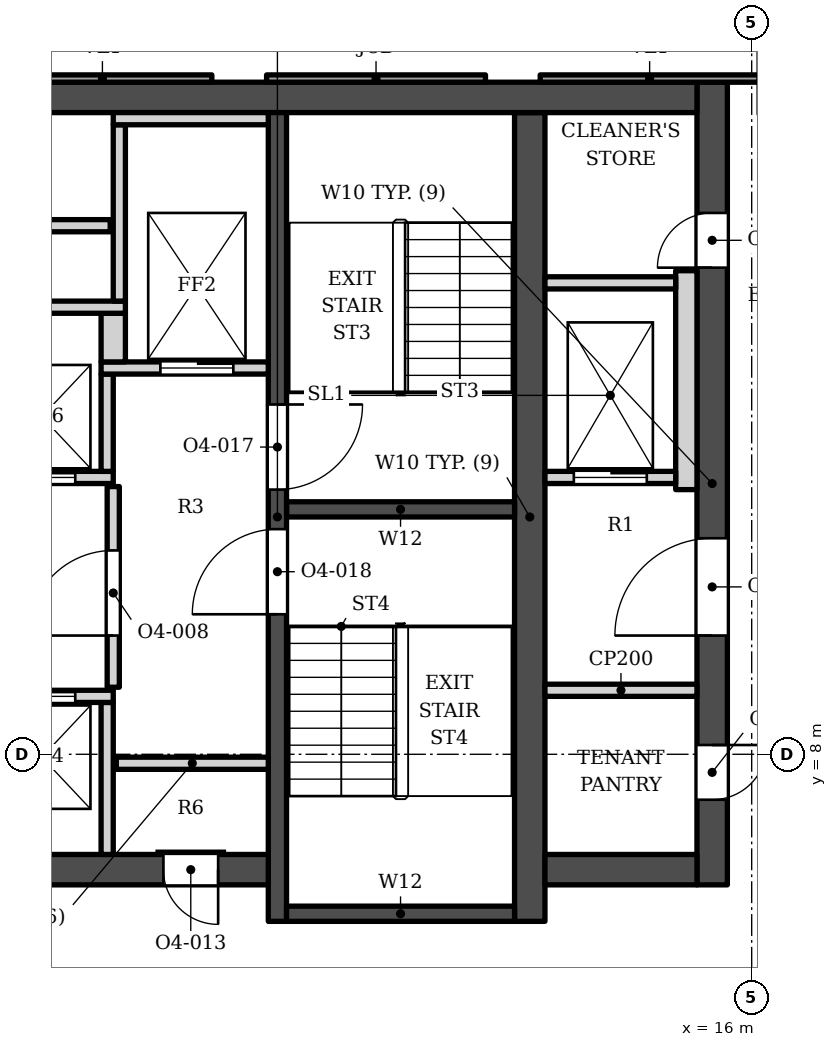
"""IFC4 building model, lengths in metres.
Left out: names, types, materials, properties, quantities, classifications, styles, units other than length and angle.
Written with IfcOpenShell. Run it as: python <this file> out.ifc"""

import sys

from ifc_helpers import new_model, si_unit, direction, frame, frame_2d, origin, place, context, subcontext, project, spatial, polyline, rectangle, outline, extrude, element, fill, save


model = new_model("IFC4")
c1 = context("Model", 3, precision=1e-05, world=origin(), true_north=direction((0.0, 1.0)))
c2 = subcontext(c1, "Body", "Model", "MODEL_VIEW")
j1 = project(units=[si_unit("LENGTHUNIT", "METRE"), si_unit("PLANEANGLEUNIT", "RADIAN")], contexts=[c1])
p1 = place(None, origin())
s1 = spatial("IfcSite", under=j1, at=p1, CompositionType="ELEMENT")
p2 = place(p1, origin())
s2 = spatial("IfcBuilding", under=s1, at=p2, CompositionType="ELEMENT")
p3 = place(p2, frame((0.0, 0.0, 179.7)))
s3 = spatial("IfcBuildingStorey", under=s2, at=p3, CompositionType="ELEMENT", Elevation=179.7)
p4 = place(p3, frame((-15.1, 18.802, 0.0), z_axis=(0.0, 0.0, 1.0), x_axis=(1.0, 0.0, 0.0)))
e1 = element("IfcWall", 1, at=p4, inside=s3, PredefinedType="SHEAR", context=c2, shape_type="SweptSolid", body=[
    extrude(rectangle(XDim=30.2, YDim=0.5, at=frame_2d((15.1, 0.0))), origin(), (0.0, 0.0, 1.0), 3.9),
])
p5 = place(p3, frame((12.35, 5.253, 0.0), z_axis=(0.0, 0.0, 1.0), x_axis=(0.0, 1.0, 0.0)))
e2 = element("IfcWall", 2, at=p5, inside=s3, PredefinedType="SHEAR", context=c2, shape_type="SweptSolid", body=[
    extrude(rectangle(XDim=13.3, YDim=0.5, at=frame_2d((6.65, 0.0))), origin(), (0.0, 0.0, 1.0), 3.9),
])
p6 = place(p3, frame((8.2, 5.253, 0.0), z_axis=(0.0, 0.0, 1.0), x_axis=(0.0, 1.0, 0.0)))
e3 = element("IfcWall", 3, at=p6, inside=s3, PredefinedType="SHEAR", context=c2, shape_type="SweptSolid", body=[
    extrude(rectangle(XDim=13.3, YDim=0.3, at=frame_2d((6.65, 0.0))), origin(), (0.0, 0.0, 1.0), 3.9),
])
p7 = place(p6, frame((7.1, 0.0, 0.0)))
e4 = element("IfcOpeningElement", 4, at=p7, cuts=e3, PredefinedType="OPENING", context=c2, shape_type="SweptSolid", body=[
    extrude(rectangle(XDim=1.4, YDim=2.1, at=frame_2d((0.7, 1.05))), frame((0.0, 0.16, 0.0), z_axis=(0.0, -1.0, 0.0), x_axis=(1.0, 0.0, 0.0)), (0.0, 0.0, 1.0), 0.32),
])
p8 = place(p6, frame((5.05, 0.0, 0.0)))
e5 = element("IfcOpeningElement", 5, at=p8, cuts=e3, PredefinedType="OPENING", context=c2, shape_type="SweptSolid", body=[
    extrude(rectangle(XDim=1.4, YDim=2.1, at=frame_2d((0.7, 1.05))), frame((0.0, 0.16, 0.0), z_axis=(0.0, -1.0, 0.0), x_axis=(1.0, 0.0, 0.0)), (0.0, 0.0, 1.0), 0.32),
])
for number, where, z_axis, x_axis in (
    (6, (8.35, 12.028, 0.0), (0.0, 0.0, 1.0), (1.0, 0.0, 0.0)),
    (7, (8.35, 5.378, 0.0), (0.0, 0.0, 1.0), (1.0, 0.0, 0.0)),
):
    element("IfcWall", number, at=place(p3, frame(where, z_axis=z_axis, x_axis=x_axis)), inside=s3, PredefinedType="SHEAR", context=c2, shape_type="SweptSolid", body=[
        extrude(rectangle(XDim=3.75, YDim=0.25, at=frame_2d((1.875, 0.0))), origin(), (0.0, 0.0, 1.0), 3.9),
    ])
p9 = place(p3, frame((1.0, 6.103, 0.0), z_axis=(0.0, 0.0, 1.0), x_axis=(1.0, 0.0, 0.0)))
e8 = element("IfcWall", 8, at=p9, inside=s3, PredefinedType="SHEAR", context=c2, shape_type="SweptSolid", body=[
    extrude(rectangle(XDim=7.05, YDim=0.5, at=frame_2d((3.525, 0.0))), origin(), (0.0, 0.0, 1.0), 3.9),
])
p10 = place(p9, frame((5.325, 0.0, 0.0)))
e9 = element("IfcOpeningElement", 9, at=p10, cuts=e8, PredefinedType="OPENING", context=c2, shape_type="SweptSolid", body=[
    extrude(rectangle(XDim=0.9, YDim=2.1, at=frame_2d((0.45, 1.05))), frame((0.0, 0.26, 0.0), z_axis=(0.0, -1.0, 0.0), x_axis=(1.0, 0.0, 0.0)), (0.0, 0.0, 1.0), 0.52),
])
p11 = place(p3, frame((12.6, 6.103, 0.0), z_axis=(0.0, 0.0, 1.0), x_axis=(1.0, 0.0, 0.0)))
e10 = element("IfcWall", 10, at=p11, inside=s3, PredefinedType="SHEAR", context=c2, shape_type="SweptSolid", body=[
    extrude(rectangle(XDim=2.5, YDim=0.5, at=frame_2d((1.25, 0.0))), origin(), (0.0, 0.0, 1.0), 3.9),
])
p12 = place(p3, frame((15.35, 5.853, 0.0), z_axis=(0.0, 0.0, 1.0), x_axis=(0.0, 1.0, 0.0)))
e11 = element("IfcWall", 11, at=p12, inside=s3, PredefinedType="SHEAR", context=c2, shape_type="SweptSolid", body=[
    extrude(rectangle(XDim=13.2, YDim=0.5, at=frame_2d((6.6, 0.0))), origin(), (0.0, 0.0, 1.0), 3.9),
])
p13 = place(p12, frame((4.1, 0.0, 0.0)))
e12 = element("IfcOpeningElement", 12, at=p13, cuts=e11, PredefinedType="OPENING", context=c2, shape_type="SweptSolid", body=[
    extrude(rectangle(XDim=1.6, YDim=2.1, at=frame_2d((0.8, 1.05))), frame((0.0, 0.26, 0.0), z_axis=(0.0, -1.0, 0.0), x_axis=(1.0, 0.0, 0.0)), (0.0, 0.0, 1.0), 0.52),
])
p14 = place(p12, frame((1.4, 0.0, 0.0)))
e13 = element("IfcOpeningElement", 13, at=p14, cuts=e11, PredefinedType="OPENING", context=c2, shape_type="SweptSolid", body=[
    extrude(rectangle(XDim=0.9, YDim=2.1, at=frame_2d((0.45, 1.05))), frame((0.0, 0.26, 0.0), z_axis=(0.0, -1.0, 0.0), x_axis=(1.0, 0.0, 0.0)), (0.0, 0.0, 1.0), 0.52),
])
p15 = place(p12, frame((10.15, 0.0, 0.0)))
e14 = element("IfcOpeningElement", 14, at=p15, cuts=e11, PredefinedType="OPENING", context=c2, shape_type="SweptSolid", body=[
    extrude(rectangle(XDim=0.9, YDim=2.1, at=frame_2d((0.45, 1.05))), frame((0.0, 0.26, 0.0), z_axis=(0.0, -1.0, 0.0), x_axis=(1.0, 0.0, 0.0)), (0.0, 0.0, 1.0), 0.52),
])
p16 = place(p3, origin())
e15 = element("IfcWall", 15, at=p16, inside=s3, PredefinedType="ELEMENTEDWALL", context=c2, shape_type="SweptSolid", body=[
    extrude(outline(polyline([(12.522, 19.173), (12.522, 19.052), (16.121, 19.052), (16.121, 19.173), (12.522, 19.173)])), origin(), (0.0, 0.0, 1.0), 3.0),
])
p17 = place(p3, origin())
e16 = element("IfcWall", 16, at=p17, inside=s3, PredefinedType="SOLIDWALL", context=c2, shape_type="SweptSolid", body=[
    extrude(outline(polyline([(8.022, 19.173), (8.022, 19.052), (11.622, 19.052), (11.622, 19.173), (8.022, 19.173)])), origin(), (0.0, 0.0, 1.0), 3.0),
])
p18 = place(p3, origin())
e17 = element("IfcWall", 17, at=p18, inside=s3, PredefinedType="ELEMENTEDWALL", context=c2, shape_type="SweptSolid", body=[
    extrude(outline(polyline([(3.522, 19.173), (3.522, 19.052), (7.122, 19.052), (7.122, 19.173), (3.522, 19.173)])), origin(), (0.0, 0.0, 1.0), 3.0),
])
for number, where, z_axis, x_axis in (
    (18, (5.4, 6.353, 0.0), (0.0, 0.0, 1.0), (0.0, 1.0, 0.0)),
    (19, (5.55, 7.853, 0.0), (0.0, 0.0, 1.0), (1.0, 0.0, 0.0)),
):
    element("IfcWall", number, at=place(p3, frame(where, z_axis=z_axis, x_axis=x_axis)), inside=s3, PredefinedType="SOLIDWALL", context=c2, shape_type="SweptSolid", body=[
        extrude(rectangle(XDim=2.5, YDim=0.2, at=frame_2d((1.25, 0.0))), origin(), (0.0, 0.0, 1.0), 3.73),
    ])
p19 = place(p3, frame((1.0, 8.953, 0.0), z_axis=(0.0, 0.0, 1.0), x_axis=(1.0, 0.0, 0.0)))
e20 = element("IfcWall", 20, at=p19, inside=s3, PredefinedType="SOLIDWALL", context=c2, shape_type="SweptSolid", body=[
    extrude(rectangle(XDim=4.5, YDim=0.2, at=frame_2d((2.25, 0.0))), origin(), (0.0, 0.0, 1.0), 3.73),
])
p20 = place(p19, frame((0.625, 0.0, 0.0)))
e21 = element("IfcOpeningElement", 21, at=p20, cuts=e20, PredefinedType="OPENING", context=c2, shape_type="SweptSolid", body=[
    extrude(rectangle(XDim=1.1, YDim=2.1, at=frame_2d((0.55, 1.05))), frame((0.0, 0.11, 0.0), z_axis=(0.0, -1.0, 0.0), x_axis=(1.0, 0.0, 0.0)), (0.0, 0.0, 1.0), 0.22),
])
p21 = place(p19, frame((2.775, 0.0, 0.0)))
e22 = element("IfcOpeningElement", 22, at=p21, cuts=e20, PredefinedType="OPENING", context=c2, shape_type="SweptSolid", body=[
    extrude(rectangle(XDim=1.1, YDim=2.1, at=frame_2d((0.55, 1.05))), frame((0.0, 0.11, 0.0), z_axis=(0.0, -1.0, 0.0), x_axis=(1.0, 0.0, 0.0)), (0.0, 0.0, 1.0), 0.22),
])
p22 = place(p3, frame((12.6, 9.052, 0.0), z_axis=(0.0, 0.0, 1.0), x_axis=(1.0, 0.0, 0.0)))
e23 = element("IfcWall", 23, at=p22, inside=s3, PredefinedType="PARTITIONING", context=c2, shape_type="SweptSolid", body=[
    extrude(rectangle(XDim=2.5, YDim=0.2, at=frame_2d((1.25, 0.0))), origin(), (0.0, 0.0, 1.0), 3.73),
])
p23 = place(p3, frame((5.5, 9.103, 0.0), z_axis=(0.0, 0.0, 1.0), x_axis=(0.0, 1.0, 0.0)))
e24 = element("IfcWall", 24, at=p23, inside=s3, PredefinedType="SOLIDWALL", context=c2, shape_type="SweptSolid", body=[
    extrude(rectangle(XDim=3.3, YDim=0.2, at=frame_2d((1.65, 0.0))), origin(), (0.0, 0.0, 1.0), 3.73),
])
p24 = place(p23, frame((0.85, 0.0, 0.0)))
e25 = element("IfcOpeningElement", 25, at=p24, cuts=e24, PredefinedType="OPENING", context=c2, shape_type="SweptSolid", body=[
    extrude(rectangle(XDim=1.4, YDim=2.1, at=frame_2d((0.7, 1.05))), frame((0.0, 0.11, 0.0), z_axis=(0.0, -1.0, 0.0), x_axis=(1.0, 0.0, 0.0)), (0.0, 0.0, 1.0), 0.22),
])
p25 = place(p3, frame((14.925, 12.353, 0.0), z_axis=(0.0, 0.0, 1.0), x_axis=(0.0, 1.0, 0.0)))
e26 = element("IfcWall", 26, at=p25, inside=s3, PredefinedType="SOLIDWALL", context=c2, shape_type="SweptSolid", body=[
    extrude(rectangle(XDim=3.6, YDim=0.35, at=frame_2d((1.8, 0.0))), origin(), (0.0, 0.0, 1.0), 3.73),
])
p26 = place(p3, frame((-1.5, 12.552, 0.0), z_axis=(0.0, 0.0, 1.0), x_axis=(1.0, 0.0, 0.0)))
e27 = element("IfcWall", 27, at=p26, inside=s3, PredefinedType="SOLIDWALL", context=c2, shape_type="SweptSolid", body=[
    extrude(rectangle(XDim=7.0, YDim=0.2, at=frame_2d((3.5, 0.0))), origin(), (0.0, 0.0, 1.0), 3.73),
])
p27 = place(p26, frame((3.075, 0.0, 0.0)))
e28 = element("IfcOpeningElement", 28, at=p27, cuts=e27, PredefinedType="OPENING", context=c2, shape_type="SweptSolid", body=[
    extrude(rectangle(XDim=1.1, YDim=2.1, at=frame_2d((0.55, 1.05))), frame((0.0, 0.11, 0.0), z_axis=(0.0, -1.0, 0.0), x_axis=(1.0, 0.0, 0.0)), (0.0, 0.0, 1.0), 0.22),
])
p28 = place(p26, frame((5.275, 0.0, 0.0)))
e29 = element("IfcOpeningElement", 29, at=p28, cuts=e27, PredefinedType="OPENING", context=c2, shape_type="SweptSolid", body=[
    extrude(rectangle(XDim=1.1, YDim=2.1, at=frame_2d((0.55, 1.05))), frame((0.0, 0.11, 0.0), z_axis=(0.0, -1.0, 0.0), x_axis=(1.0, 0.0, 0.0)), (0.0, 0.0, 1.0), 0.22),
])
p29 = place(p3, frame((12.6, 12.552, 0.0), z_axis=(0.0, 0.0, 1.0), x_axis=(1.0, 0.0, 0.0)))
e30 = element("IfcWall", 30, at=p29, inside=s3, PredefinedType="SOLIDWALL", context=c2, shape_type="SweptSolid", body=[
    extrude(rectangle(XDim=2.15, YDim=0.2, at=frame_2d((1.075, 0.0))), origin(), (0.0, 0.0, 1.0), 3.73),
])
p30 = place(p29, frame((0.475, 0.0, 0.0)))
e31 = element("IfcOpeningElement", 31, at=p30, cuts=e30, PredefinedType="OPENING", context=c2, shape_type="SweptSolid", body=[
    extrude(rectangle(XDim=1.2, YDim=2.1, at=frame_2d((0.6, 1.05))), frame((0.0, 0.11, 0.0), z_axis=(0.0, -1.0, 0.0), x_axis=(1.0, 0.0, 0.0)), (0.0, 0.0, 1.0), 0.22),
])
p31 = place(p3, frame((5.4, 12.653, 0.0), z_axis=(0.0, 0.0, 1.0), x_axis=(0.0, 1.0, 0.0)))
e32 = element("IfcWall", 32, at=p31, inside=s3, PredefinedType="SOLIDWALL", context=c2, shape_type="SweptSolid", body=[
    extrude(rectangle(XDim=1.6, YDim=0.2, at=frame_2d((0.8, 0.0))), origin(), (0.0, 0.0, 1.0), 3.73),
])
p32 = place(p3, frame((5.3, 14.353, 0.0), z_axis=(0.0, 0.0, 1.0), x_axis=(1.0, 0.0, 0.0)))
e33 = element("IfcWall", 33, at=p32, inside=s3, PredefinedType="SOLIDWALL", context=c2, shape_type="SweptSolid", body=[
    extrude(rectangle(XDim=2.75, YDim=0.2, at=frame_2d((1.375, 0.0))), origin(), (0.0, 0.0, 1.0), 3.73),
])
p33 = place(p32, frame((0.975, 0.0, 0.0)))
e34 = element("IfcOpeningElement", 34, at=p33, cuts=e33, PredefinedType="OPENING", context=c2, shape_type="SweptSolid", body=[
    extrude(rectangle(XDim=1.2, YDim=2.1, at=frame_2d((0.6, 1.05))), frame((0.0, 0.11, 0.0), z_axis=(0.0, -1.0, 0.0), x_axis=(1.0, 0.0, 0.0)), (0.0, 0.0, 1.0), 0.22),
])
p34 = place(p3, frame((5.5, 14.453, 0.0), z_axis=(0.0, 0.0, 1.0), x_axis=(0.0, 1.0, 0.0)))
e35 = element("IfcWall", 35, at=p34, inside=s3, PredefinedType="SOLIDWALL", context=c2, shape_type="SweptSolid", body=[
    extrude(rectangle(XDim=0.8, YDim=0.4, at=frame_2d((0.4, 0.0))), origin(), (0.0, 0.0, 1.0), 3.73),
])
p35 = place(p3, frame((-1.5, 15.353, 0.0), z_axis=(0.0, 0.0, 1.0), x_axis=(1.0, 0.0, 0.0)))
e36 = element("IfcWall", 36, at=p35, inside=s3, PredefinedType="SOLIDWALL", context=c2, shape_type="SweptSolid", body=[
    extrude(rectangle(XDim=7.2, YDim=0.2, at=frame_2d((3.6, 0.0))), origin(), (0.0, 0.0, 1.0), 3.73),
])
p36 = place(p3, frame((5.6, 15.453, 0.0), z_axis=(0.0, 0.0, 1.0), x_axis=(0.0, 1.0, 0.0)))
e37 = element("IfcWall", 37, at=p36, inside=s3, PredefinedType="SOLIDWALL", context=c2, shape_type="SweptSolid", body=[
    extrude(rectangle(XDim=2.9, YDim=0.2, at=frame_2d((1.45, 0.0))), origin(), (0.0, 0.0, 1.0), 3.73),
])
p37 = place(p3, frame((12.6, 15.753, 0.0), z_axis=(0.0, 0.0, 1.0), x_axis=(1.0, 0.0, 0.0)))
e38 = element("IfcWall", 38, at=p37, inside=s3, PredefinedType="SOLIDWALL", context=c2, shape_type="SweptSolid", body=[
    extrude(rectangle(XDim=2.15, YDim=0.2, at=frame_2d((1.075, 0.0))), origin(), (0.0, 0.0, 1.0), 3.73),
])
p38 = place(p3, frame((-1.4, 16.693, 0.0), z_axis=(0.0, 0.0, 1.0), x_axis=(1.0, 0.0, 0.0)))
e39 = element("IfcWall", 39, at=p38, inside=s3, PredefinedType="SOLIDWALL", context=c2, shape_type="SweptSolid", body=[
    extrude(rectangle(XDim=6.85, YDim=0.2, at=frame_2d((3.425, 0.0))), origin(), (0.0, 0.0, 1.0), 3.73),
])
p39 = place(p3, frame((5.5, 18.453, 0.0), z_axis=(0.0, 0.0, 1.0), x_axis=(1.0, 0.0, 0.0)))
e40 = element("IfcWall", 40, at=p39, inside=s3, PredefinedType="SOLIDWALL", context=c2, shape_type="SweptSolid", body=[
    extrude(rectangle(XDim=2.55, YDim=0.2, at=frame_2d((1.275, 0.0))), origin(), (0.0, 0.0, 1.0), 3.73),
])
p40 = place(p21, origin())
e41 = element("IfcDoor", 41, at=p40, inside=s3, OperationType="DOUBLE_DOOR_SLIDING", PredefinedType="DOOR", context=c2, shape_type="SweptSolid", body=[
    extrude(rectangle(XDim=1.1, YDim=2.1, at=frame_2d((0.55, 1.05))), frame((0.0, 0.025, 0.0), z_axis=(0.0, -1.0, 0.0), x_axis=(1.0, 0.0, 0.0)), (0.0, 0.0, 1.0), 0.05),
])
fill(e22, e41)
p41 = place(p28, origin())
e42 = element("IfcDoor", 42, at=p41, inside=s3, OperationType="DOUBLE_DOOR_SLIDING", PredefinedType="DOOR", context=c2, shape_type="SweptSolid", body=[
    extrude(rectangle(XDim=1.1, YDim=2.1, at=frame_2d((0.55, 1.05))), frame((0.0, 0.025, 0.0), z_axis=(0.0, -1.0, 0.0), x_axis=(1.0, 0.0, 0.0)), (0.0, 0.0, 1.0), 0.05),
])
fill(e29, e42)
p42 = place(p33, origin())
e43 = element("IfcDoor", 43, at=p42, inside=s3, OperationType="DOUBLE_DOOR_SLIDING", PredefinedType="DOOR", context=c2, shape_type="SweptSolid", body=[
    extrude(rectangle(XDim=1.2, YDim=2.1, at=frame_2d((0.6, 1.05))), frame((0.0, 0.025, 0.0), z_axis=(0.0, -1.0, 0.0), x_axis=(1.0, 0.0, 0.0)), (0.0, 0.0, 1.0), 0.05),
])
fill(e34, e43)
p43 = place(p30, origin())
e44 = element("IfcDoor", 44, at=p43, inside=s3, OperationType="DOUBLE_DOOR_SLIDING", PredefinedType="DOOR", context=c2, shape_type="SweptSolid", body=[
    extrude(rectangle(XDim=1.2, YDim=2.1, at=frame_2d((0.6, 1.05))), frame((0.0, 0.025, 0.0), z_axis=(0.0, -1.0, 0.0), x_axis=(1.0, 0.0, 0.0)), (0.0, 0.0, 1.0), 0.05),
])
fill(e31, e44)
p44 = place(p7, origin())
e45 = element("IfcDoor", 45, at=p44, inside=s3, OperationType="SINGLE_SWING_RIGHT", PredefinedType="DOOR", context=c2, shape_type="SweptSolid", body=[
    extrude(rectangle(XDim=1.4, YDim=2.1, at=frame_2d((0.7, 1.05))), frame((0.0, 0.025, 0.0), z_axis=(0.0, -1.0, 0.0), x_axis=(1.0, 0.0, 0.0)), (0.0, 0.0, 1.0), 0.05),
])
fill(e4, e45)
p45 = place(p8, origin())
e46 = element("IfcDoor", 46, at=p45, inside=s3, OperationType="SINGLE_SWING_LEFT", PredefinedType="DOOR", context=c2, shape_type="SweptSolid", body=[
    extrude(rectangle(XDim=1.4, YDim=2.1, at=frame_2d((0.7, 1.05))), frame((0.0, 0.025, 0.0), z_axis=(0.0, -1.0, 0.0), x_axis=(1.0, 0.0, 0.0)), (0.0, 0.0, 1.0), 0.05),
])
fill(e5, e46)
p46 = place(p24, origin())
e47 = element("IfcDoor", 47, at=p46, inside=s3, OperationType="SINGLE_SWING_LEFT", PredefinedType="DOOR", context=c2, shape_type="SweptSolid", body=[
    extrude(rectangle(XDim=1.4, YDim=2.1, at=frame_2d((0.7, 1.05))), frame((0.0, 0.025, 0.0), z_axis=(0.0, -1.0, 0.0), x_axis=(1.0, 0.0, 0.0)), (0.0, 0.0, 1.0), 0.05),
])
fill(e25, e47)
p47 = place(p10, origin())
e48 = element("IfcDoor", 48, at=p47, inside=s3, OperationType="SINGLE_SWING_RIGHT", PredefinedType="DOOR", context=c2, shape_type="SweptSolid", body=[
    extrude(rectangle(XDim=0.9, YDim=2.1, at=frame_2d((0.45, 1.05))), frame((0.0, 0.025, 0.0), z_axis=(0.0, -1.0, 0.0), x_axis=(1.0, 0.0, 0.0)), (0.0, 0.0, 1.0), 0.05),
])
fill(e9, e48)
p48 = place(p13, origin())
e49 = element("IfcDoor", 49, at=p48, inside=s3, OperationType="DOUBLE_DOOR_SINGLE_SWING", PredefinedType="DOOR", context=c2, shape_type="SweptSolid", body=[
    extrude(rectangle(XDim=1.6, YDim=2.1, at=frame_2d((0.8, 1.05))), frame((0.0, 0.025, 0.0), z_axis=(0.0, -1.0, 0.0), x_axis=(1.0, 0.0, 0.0)), (0.0, 0.0, 1.0), 0.05),
])
fill(e12, e49)
p49 = place(p14, origin())
e50 = element("IfcDoor", 50, at=p49, inside=s3, OperationType="SINGLE_SWING_RIGHT", PredefinedType="DOOR", context=c2, shape_type="SweptSolid", body=[
    extrude(rectangle(XDim=0.9, YDim=2.1, at=frame_2d((0.45, 1.05))), frame((0.0, 0.025, 0.0), z_axis=(0.0, -1.0, 0.0), x_axis=(1.0, 0.0, 0.0)), (0.0, 0.0, 1.0), 0.05),
])
fill(e13, e50)
p50 = place(p15, origin())
e51 = element("IfcDoor", 51, at=p50, inside=s3, OperationType="SINGLE_SWING_LEFT", PredefinedType="DOOR", context=c2, shape_type="SweptSolid", body=[
    extrude(rectangle(XDim=0.9, YDim=2.1, at=frame_2d((0.45, 1.05))), frame((0.0, 0.025, 0.0), z_axis=(0.0, -1.0, 0.0), x_axis=(1.0, 0.0, 0.0)), (0.0, 0.0, 1.0), 0.05),
])
fill(e14, e51)
save(model, sys.argv[1])
